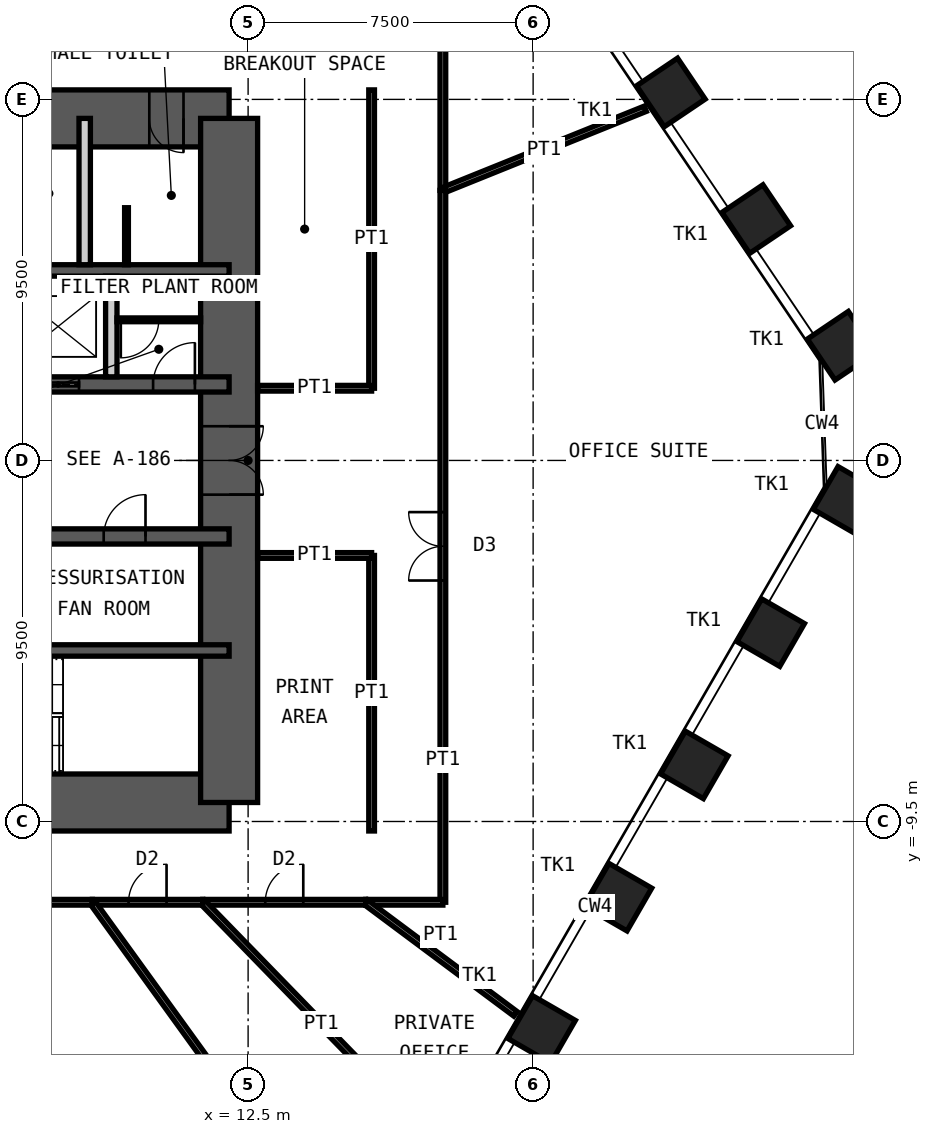
"""IFC4 building model, lengths in metres.
Left out: names, types, materials, properties, quantities, classifications, styles, units other than length and angle.
Written with IfcOpenShell. Run it as: python <this file> out.ifc"""

import sys

from ifc_helpers import new_model, si_unit, direction, frame, frame_2d, origin, origin_2d, place, context, subcontext, project, spatial, rectangle, hollow_rectangle, extrude, element, fill, save


model = new_model("IFC4")
c1 = context("Model", 3, precision=1e-05, world=origin(), true_north=direction((0.0, 1.0)))
c2 = subcontext(c1, "Body", "Model", "MODEL_VIEW")
j1 = project(units=[si_unit("LENGTHUNIT", "METRE"), si_unit("PLANEANGLEUNIT", "RADIAN")], contexts=[c1])
p1 = place(None, origin())
s1 = spatial("IfcSite", under=j1, at=p1, CompositionType="ELEMENT")
p2 = place(p1, origin())
s2 = spatial("IfcBuilding", under=s1, at=p2, CompositionType="ELEMENT")
p3 = place(p2, frame((0.0, 0.0, 170.2)))
s3 = spatial("IfcBuildingStorey", under=s2, at=p3, CompositionType="ELEMENT", Elevation=170.2)
for number, where, z_axis, x_axis in (
    (1, (23.625, 9.682, 0.0), (0.0, 0.0, 1.0), (-0.559, 0.829, 0.0)),
    (2, (25.872, 6.351, 0.0), (0.0, 0.0, 1.0), (-0.559, 0.829, 0.0)),
    (3, (28.119, 3.019, 0.0), (0.0, 0.0, 1.0), (-0.559, 0.829, 0.0)),
    (4, (28.261, -1.05, 0.0), (0.0, 0.0, 1.0), (0.5, 0.866, 0.0)),
    (5, (26.252, -4.53, 0.0), (0.0, 0.0, 1.0), (0.5, 0.866, 0.0)),
    (6, (24.242, -8.011, 0.0), (0.0, 0.0, 1.0), (0.5, 0.866, 0.0)),
    (7, (22.233, -11.491, 0.0), (0.0, 0.0, 1.0), (0.5, 0.866, 0.0)),
    (8, (20.223, -14.972, 0.0), (0.0, 0.0, 1.0), (0.5, 0.866, 0.0)),
):
    element("IfcColumn", number, at=place(p3, frame(where, z_axis=z_axis, x_axis=x_axis)), inside=s3, PredefinedType="COLUMN", context=c2, shape_type="SweptSolid", body=[
        extrude(hollow_rectangle(XDim=1.3, YDim=1.3, WallThickness=0.1, at=origin_2d()), origin(), (0.0, 0.0, 1.0), 4.2),
    ])
p4 = place(p3, frame((-12.0, 9.0, 0.0), z_axis=(0.0, 0.0, 1.0), x_axis=(1.0, 0.0, 0.0)))
e9 = element("IfcWall", 9, at=p4, inside=s3, PredefinedType="SHEAR", context=c2, shape_type="SweptSolid", body=[
    extrude(rectangle(XDim=24.0, YDim=1.5, at=frame_2d((12.0, 0.0))), origin(), (0.0, 0.0, 1.0), 4.2),
])
p5 = place(p4, frame((10.4, 0.0, 0.0)))
e10 = element("IfcOpeningElement", 10, at=p5, cuts=e9, PredefinedType="OPENING", context=c2, shape_type="SweptSolid", body=[
    extrude(rectangle(XDim=1.0, YDim=2.1, at=frame_2d((0.5, 1.05))), frame((0.0, 0.76, 0.0), z_axis=(0.0, -1.0, 0.0), x_axis=(1.0, 0.0, 0.0)), (0.0, 0.0, 1.0), 1.52),
])
p6 = place(p4, frame((17.6, 0.0, 0.0)))
e11 = element("IfcOpeningElement", 11, at=p6, cuts=e9, PredefinedType="OPENING", context=c2, shape_type="SweptSolid", body=[
    extrude(rectangle(XDim=0.9, YDim=2.1, at=frame_2d((0.45, 1.05))), frame((0.0, 0.76, 0.0), z_axis=(0.0, -1.0, 0.0), x_axis=(1.0, 0.0, 0.0)), (0.0, 0.0, 1.0), 1.52),
])
p7 = place(p4, frame((21.9, 0.0, 0.0)))
e12 = element("IfcOpeningElement", 12, at=p7, cuts=e9, PredefinedType="OPENING", context=c2, shape_type="SweptSolid", body=[
    extrude(rectangle(XDim=0.9, YDim=2.1, at=frame_2d((0.45, 1.05))), frame((0.0, 0.76, 0.0), z_axis=(0.0, -1.0, 0.0), x_axis=(1.0, 0.0, 0.0)), (0.0, 0.0, 1.0), 1.52),
])
p8 = place(p3, frame((-12.0, -9.0, 0.0), z_axis=(0.0, 0.0, 1.0), x_axis=(1.0, 0.0, 0.0)))
e13 = element("IfcWall", 13, at=p8, inside=s3, PredefinedType="SHEAR", context=c2, shape_type="SweptSolid", body=[
    extrude(rectangle(XDim=24.0, YDim=1.5, at=frame_2d((12.0, 0.0))), origin(), (0.0, 0.0, 1.0), 4.2),
])
p9 = place(p8, frame((1.35, 0.0, 0.0)))
e14 = element("IfcOpeningElement", 14, at=p9, cuts=e13, PredefinedType="OPENING", context=c2, shape_type="SweptSolid", body=[
    extrude(rectangle(XDim=1.0, YDim=2.1, at=frame_2d((0.5, 1.05))), frame((0.0, 0.76, 0.0), z_axis=(0.0, -1.0, 0.0), x_axis=(1.0, 0.0, 0.0)), (0.0, 0.0, 1.0), 1.52),
])
p10 = place(p8, frame((5.325, 0.0, 0.0)))
e15 = element("IfcOpeningElement", 15, at=p10, cuts=e13, PredefinedType="OPENING", context=c2, shape_type="SweptSolid", body=[
    extrude(rectangle(XDim=1.15, YDim=2.1, at=frame_2d((0.575, 1.05))), frame((0.0, 0.76, 0.0), z_axis=(0.0, -1.0, 0.0), x_axis=(1.0, 0.0, 0.0)), (0.0, 0.0, 1.0), 1.52),
])
p11 = place(p8, frame((12.6, 0.0, 0.0)))
e16 = element("IfcOpeningElement", 16, at=p11, cuts=e13, PredefinedType="OPENING", context=c2, shape_type="SweptSolid", body=[
    extrude(rectangle(XDim=1.0, YDim=2.1, at=frame_2d((0.5, 1.05))), frame((0.0, 0.76, 0.0), z_axis=(0.0, -1.0, 0.0), x_axis=(1.0, 0.0, 0.0)), (0.0, 0.0, 1.0), 1.52),
])
p12 = place(p3, frame((12.0, -9.0, 0.0), z_axis=(0.0, 0.0, 1.0), x_axis=(0.0, 1.0, 0.0)))
e17 = element("IfcWall", 17, at=p12, inside=s3, PredefinedType="SHEAR", context=c2, shape_type="SweptSolid", body=[
    extrude(rectangle(XDim=18.0, YDim=1.5, at=frame_2d((9.0, 0.0))), origin(), (0.0, 0.0, 1.0), 4.2),
])
p13 = place(p12, frame((8.1, 0.0, 0.0)))
e18 = element("IfcOpeningElement", 18, at=p13, cuts=e17, PredefinedType="OPENING", context=c2, shape_type="SweptSolid", body=[
    extrude(rectangle(XDim=1.8, YDim=2.1, at=frame_2d((0.9, 1.05))), frame((0.0, 0.76, 0.0), z_axis=(0.0, -1.0, 0.0), x_axis=(1.0, 0.0, 0.0)), (0.0, 0.0, 1.0), 1.52),
])
p14 = place(p3, frame((-12.0, 5.0, 0.0), z_axis=(0.0, 0.0, 1.0), x_axis=(1.0, 0.0, 0.0)))
e19 = element("IfcWall", 19, at=p14, inside=s3, PredefinedType="SHEAR", context=c2, shape_type="SweptSolid", body=[
    extrude(rectangle(XDim=24.0, YDim=0.3, at=frame_2d((12.0, 0.0))), origin(), (0.0, 0.0, 1.0), 4.2),
])
p15 = place(p3, frame((-12.0, 2.0, 0.0), z_axis=(0.0, 0.0, 1.0), x_axis=(1.0, 0.0, 0.0)))
e20 = element("IfcWall", 20, at=p15, inside=s3, PredefinedType="SHEAR", context=c2, shape_type="SweptSolid", body=[
    extrude(rectangle(XDim=24.0, YDim=0.4, at=frame_2d((12.0, 0.0))), origin(), (0.0, 0.0, 1.0), 4.2),
])
p16 = place(p15, frame((2.4, 0.0, 0.0)))
e21 = element("IfcOpeningElement", 21, at=p16, cuts=e20, PredefinedType="OPENING", context=c2, shape_type="SweptSolid", body=[
    extrude(rectangle(XDim=1.1, YDim=2.1, at=frame_2d((0.55, 1.05))), frame((0.0, 0.21, 0.0), z_axis=(0.0, -1.0, 0.0), x_axis=(1.0, 0.0, 0.0)), (0.0, 0.0, 1.0), 0.42),
])
p17 = place(p15, frame((22.0, 0.0, 0.0)))
e22 = element("IfcOpeningElement", 22, at=p17, cuts=e20, PredefinedType="OPENING", context=c2, shape_type="SweptSolid", body=[
    extrude(rectangle(XDim=1.1, YDim=2.1, at=frame_2d((0.55, 1.05))), frame((0.0, 0.21, 0.0), z_axis=(0.0, -1.0, 0.0), x_axis=(1.0, 0.0, 0.0)), (0.0, 0.0, 1.0), 0.42),
])
p18 = place(p15, frame((10.15, 0.0, 0.0)))
e23 = element("IfcOpeningElement", 23, at=p18, cuts=e20, PredefinedType="OPENING", context=c2, shape_type="SweptSolid", body=[
    extrude(rectangle(XDim=1.0, YDim=2.1, at=frame_2d((0.5, 1.05))), frame((0.0, 0.21, 0.0), z_axis=(0.0, -1.0, 0.0), x_axis=(1.0, 0.0, 0.0)), (0.0, 0.0, 1.0), 0.42),
])
p19 = place(p15, frame((6.9, 0.0, 0.0)))
e24 = element("IfcOpeningElement", 24, at=p19, cuts=e20, PredefinedType="OPENING", context=c2, shape_type="SweptSolid", body=[
    extrude(rectangle(XDim=1.0, YDim=2.1, at=frame_2d((0.5, 1.05))), frame((0.0, 0.21, 0.0), z_axis=(0.0, -1.0, 0.0), x_axis=(1.0, 0.0, 0.0)), (0.0, 0.0, 1.0), 0.42),
])
p20 = place(p15, frame((13.35, 0.0, 0.0)))
e25 = element("IfcOpeningElement", 25, at=p20, cuts=e20, PredefinedType="OPENING", context=c2, shape_type="SweptSolid", body=[
    extrude(rectangle(XDim=1.1, YDim=2.4, at=frame_2d((0.55, 1.2))), frame((0.0, 0.21, 0.0), z_axis=(0.0, -1.0, 0.0), x_axis=(1.0, 0.0, 0.0)), (0.0, 0.0, 1.0), 0.42),
])
p21 = place(p15, frame((16.15, 0.0, 0.0)))
e26 = element("IfcOpeningElement", 26, at=p21, cuts=e20, PredefinedType="OPENING", context=c2, shape_type="SweptSolid", body=[
    extrude(rectangle(XDim=1.1, YDim=2.4, at=frame_2d((0.55, 1.2))), frame((0.0, 0.21, 0.0), z_axis=(0.0, -1.0, 0.0), x_axis=(1.0, 0.0, 0.0)), (0.0, 0.0, 1.0), 0.42),
])
p22 = place(p15, frame((18.95, 0.0, 0.0)))
e27 = element("IfcOpeningElement", 27, at=p22, cuts=e20, PredefinedType="OPENING", context=c2, shape_type="SweptSolid", body=[
    extrude(rectangle(XDim=1.1, YDim=2.4, at=frame_2d((0.55, 1.2))), frame((0.0, 0.21, 0.0), z_axis=(0.0, -1.0, 0.0), x_axis=(1.0, 0.0, 0.0)), (0.0, 0.0, 1.0), 0.42),
])
p23 = place(p3, frame((-12.0, -2.0, 0.0), z_axis=(0.0, 0.0, 1.0), x_axis=(1.0, 0.0, 0.0)))
e28 = element("IfcWall", 28, at=p23, inside=s3, PredefinedType="SHEAR", context=c2, shape_type="SweptSolid", body=[
    extrude(rectangle(XDim=24.0, YDim=0.4, at=frame_2d((12.0, 0.0))), origin(), (0.0, 0.0, 1.0), 4.2),
])
p24 = place(p23, frame((1.1, 0.0, 0.0)))
e29 = element("IfcOpeningElement", 29, at=p24, cuts=e28, PredefinedType="OPENING", context=c2, shape_type="SweptSolid", body=[
    extrude(rectangle(XDim=1.1, YDim=2.1, at=frame_2d((0.55, 1.05))), frame((0.0, 0.21, 0.0), z_axis=(0.0, -1.0, 0.0), x_axis=(1.0, 0.0, 0.0)), (0.0, 0.0, 1.0), 0.42),
])
p25 = place(p23, frame((13.55, 0.0, 0.0)))
e30 = element("IfcOpeningElement", 30, at=p25, cuts=e28, PredefinedType="OPENING", context=c2, shape_type="SweptSolid", body=[
    extrude(rectangle(XDim=1.1, YDim=2.1, at=frame_2d((0.55, 1.05))), frame((0.0, 0.21, 0.0), z_axis=(0.0, -1.0, 0.0), x_axis=(1.0, 0.0, 0.0)), (0.0, 0.0, 1.0), 0.42),
])
p26 = place(p23, frame((20.7, 0.0, 0.0)))
e31 = element("IfcOpeningElement", 31, at=p26, cuts=e28, PredefinedType="OPENING", context=c2, shape_type="SweptSolid", body=[
    extrude(rectangle(XDim=1.1, YDim=2.1, at=frame_2d((0.55, 1.05))), frame((0.0, 0.21, 0.0), z_axis=(0.0, -1.0, 0.0), x_axis=(1.0, 0.0, 0.0)), (0.0, 0.0, 1.0), 0.42),
])
p27 = place(p23, frame((4.0, 0.0, 0.0)))
e32 = element("IfcOpeningElement", 32, at=p27, cuts=e28, PredefinedType="OPENING", context=c2, shape_type="SweptSolid", body=[
    extrude(rectangle(XDim=1.0, YDim=2.1, at=frame_2d((0.5, 1.05))), frame((0.0, 0.21, 0.0), z_axis=(0.0, -1.0, 0.0), x_axis=(1.0, 0.0, 0.0)), (0.0, 0.0, 1.0), 0.42),
])
p28 = place(p3, frame((-12.0, -5.0, 0.0), z_axis=(0.0, 0.0, 1.0), x_axis=(1.0, 0.0, 0.0)))
e33 = element("IfcWall", 33, at=p28, inside=s3, PredefinedType="SHEAR", context=c2, shape_type="SweptSolid", body=[
    extrude(rectangle(XDim=24.0, YDim=0.3, at=frame_2d((12.0, 0.0))), origin(), (0.0, 0.0, 1.0), 4.2),
])
p29 = place(p3, frame((8.2, 5.15, 0.0), z_axis=(0.0, 0.0, 1.0), x_axis=(0.0, 1.0, 0.0)))
e34 = element("IfcWall", 34, at=p29, inside=s3, PredefinedType="PARTITIONING", context=c2, shape_type="SweptSolid", body=[
    extrude(rectangle(XDim=3.85, YDim=0.3, at=frame_2d((1.925, 0.0))), origin(), (0.0, 0.0, 1.0), 3.98),
])
p30 = place(p3, frame((8.9, 2.2, 0.0), z_axis=(0.0, 0.0, 1.0), x_axis=(0.0, 1.0, 0.0)))
e35 = element("IfcWall", 35, at=p30, inside=s3, PredefinedType="PARTITIONING", context=c2, shape_type="SweptSolid", body=[
    extrude(rectangle(XDim=2.65, YDim=0.3, at=frame_2d((1.325, 0.0))), origin(), (0.0, 0.0, 1.0), 3.98),
])
p31 = place(p3, frame((9.05, 3.7, 0.0), z_axis=(0.0, 0.0, 1.0), x_axis=(1.0, 0.0, 0.0)))
e36 = element("IfcWall", 36, at=p31, inside=s3, PredefinedType="PARTITIONING", context=c2, shape_type="SweptSolid", body=[
    extrude(rectangle(XDim=2.2, YDim=0.1, at=frame_2d((1.1, 0.0))), origin(), (0.0, 0.0, 1.0), 3.98),
])
p32 = place(p31, frame((0.1, 0.0, 0.0)))
e37 = element("IfcOpeningElement", 37, at=p32, cuts=e36, PredefinedType="OPENING", context=c2, shape_type="SweptSolid", body=[
    extrude(rectangle(XDim=1.0, YDim=2.4, at=frame_2d((0.5, 1.2))), frame((0.0, 0.06, 0.0), z_axis=(0.0, -1.0, 0.0), x_axis=(1.0, 0.0, 0.0)), (0.0, 0.0, 1.0), 0.12),
])
p33 = place(p3, frame((9.3, 5.15, 0.0), z_axis=(0.0, 0.0, 1.0), x_axis=(0.0, 1.0, 0.0)))
e38 = element("IfcWall", 38, at=p33, inside=s3, PredefinedType="PARTITIONING", context=c2, shape_type="SweptSolid", body=[
    extrude(rectangle(XDim=1.5, YDim=0.1, at=frame_2d((0.75, 0.0))), origin(), (0.0, 0.0, 1.0), 2.1),
])
p34 = place(p3, frame((17.625, 11.625, 0.0), z_axis=(0.0, 0.0, 1.0), x_axis=(0.0, -1.0, 0.0)))
e39 = element("IfcWall", 39, at=p34, inside=s3, PredefinedType="PARTITIONING", context=c2, shape_type="SweptSolid", body=[
    extrude(rectangle(XDim=4.519, YDim=0.15, at=frame_2d((2.26, 0.0))), origin(), (0.0, 0.0, 1.0), 3.92),
])
p35 = place(p3, frame((22.951, 9.254, 0.0), z_axis=(0.0, 0.0, 1.0), x_axis=(-0.927444087873, -0.373961848147, 0.0)))
e40 = element("IfcWall", 40, at=p35, inside=s3, PredefinedType="PARTITIONING", context=c2, shape_type="SweptSolid", body=[
    extrude(rectangle(XDim=5.743, YDim=0.15, at=frame_2d((2.872, 0.0))), origin(), (0.0, 0.0, 1.0), 2.72),
])
p36 = place(p3, frame((17.625, 7.106, 0.0), z_axis=(0.0, 0.0, 1.0), x_axis=(0.0, -1.0, 0.0)))
e41 = element("IfcWall", 41, at=p36, inside=s3, PredefinedType="PARTITIONING", context=c2, shape_type="SweptSolid", body=[
    extrude(rectangle(XDim=18.731, YDim=0.15, at=frame_2d((9.365, 0.0))), origin(), (0.0, 0.0, 1.0), 3.92),
])
p37 = place(p36, frame((8.466, 0.0, 0.0)))
e42 = element("IfcOpeningElement", 42, at=p37, cuts=e41, PredefinedType="OPENING", context=c2, shape_type="SweptSolid", body=[
    extrude(rectangle(XDim=1.8, YDim=2.4, at=frame_2d((0.9, 1.2))), frame((0.0, 0.085, 0.0), z_axis=(0.0, -1.0, 0.0), x_axis=(1.0, 0.0, 0.0)), (0.0, 0.0, 1.0), 0.17),
])
p38 = place(p3, frame((17.625, -11.625, 0.0), z_axis=(0.0, 0.0, 1.0), x_axis=(-1.0, 0.0, 0.0)))
e43 = element("IfcWall", 43, at=p38, inside=s3, PredefinedType="PARTITIONING", context=c2, shape_type="SweptSolid", body=[
    extrude(rectangle(XDim=2.029, YDim=0.15, at=frame_2d((1.014, 0.0))), origin(), (0.0, 0.0, 1.0), 3.92),
])
p39 = place(p3, frame((19.537, -14.562, 0.0), z_axis=(0.0, 0.0, 1.0), x_axis=(-0.801778753003, 0.597620976233, 0.0)))
e44 = element("IfcWall", 44, at=p39, inside=s3, PredefinedType="PARTITIONING", context=c2, shape_type="SweptSolid", body=[
    extrude(rectangle(XDim=4.915, YDim=0.15, at=frame_2d((2.458, 0.0))), origin(), (0.0, 0.0, 1.0), 2.72),
])
p40 = place(p3, frame((15.596, -11.625, 0.0), z_axis=(0.0, 0.0, 1.0), x_axis=(-1.0, 0.0, 0.0)))
e45 = element("IfcWall", 45, at=p40, inside=s3, PredefinedType="PARTITIONING", context=c2, shape_type="SweptSolid", body=[
    extrude(rectangle(XDim=4.289, YDim=0.15, at=frame_2d((2.145, 0.0))), origin(), (0.0, 0.0, 1.0), 3.92),
])
p41 = place(p40, frame((1.645, 0.0, 0.0)))
e46 = element("IfcOpeningElement", 46, at=p41, cuts=e45, PredefinedType="OPENING", context=c2, shape_type="SweptSolid", body=[
    extrude(rectangle(XDim=1.0, YDim=2.4, at=frame_2d((0.5, 1.2))), frame((0.0, 0.085, 0.0), z_axis=(0.0, -1.0, 0.0), x_axis=(1.0, 0.0, 0.0)), (0.0, 0.0, 1.0), 0.17),
])
p42 = place(p3, frame((17.538, -18.031, 0.0), z_axis=(0.0, 0.0, 1.0), x_axis=(-0.697230918085, 0.716846599257, 0.0)))
e47 = element("IfcWall", 47, at=p42, inside=s3, PredefinedType="PARTITIONING", context=c2, shape_type="SweptSolid", body=[
    extrude(rectangle(XDim=8.936, YDim=0.15, at=frame_2d((4.468, 0.0))), origin(), (0.0, 0.0, 1.0), 2.72),
])
p43 = place(p3, frame((11.307, -11.625, 0.0), z_axis=(0.0, 0.0, 1.0), x_axis=(-1.0, 0.0, 0.0)))
e48 = element("IfcWall", 48, at=p43, inside=s3, PredefinedType="PARTITIONING", context=c2, shape_type="SweptSolid", body=[
    extrude(rectangle(XDim=2.906, YDim=0.15, at=frame_2d((1.453, 0.0))), origin(), (0.0, 0.0, 1.0), 3.92),
])
p44 = place(p43, frame((0.953, 0.0, 0.0)))
e49 = element("IfcOpeningElement", 49, at=p44, cuts=e48, PredefinedType="OPENING", context=c2, shape_type="SweptSolid", body=[
    extrude(rectangle(XDim=1.0, YDim=2.4, at=frame_2d((0.5, 1.2))), frame((0.0, 0.085, 0.0), z_axis=(0.0, -1.0, 0.0), x_axis=(1.0, 0.0, 0.0)), (0.0, 0.0, 1.0), 0.17),
])
p45 = place(p3, frame((15.54, -21.502, 0.0), z_axis=(0.0, 0.0, 1.0), x_axis=(-0.585731902034, 0.810504866697, 0.0)))
e50 = element("IfcWall", 50, at=p45, inside=s3, PredefinedType="PARTITIONING", context=c2, shape_type="SweptSolid", body=[
    extrude(rectangle(XDim=12.187, YDim=0.15, at=frame_2d((6.093, 0.0))), origin(), (0.0, 0.0, 1.0), 2.72),
])
p46 = place(p3, frame((8.401, -11.625, 0.0), z_axis=(0.0, 0.0, 1.0), x_axis=(-1.0, 0.0, 0.0)))
e51 = element("IfcWall", 51, at=p46, inside=s3, PredefinedType="PARTITIONING", context=c2, shape_type="SweptSolid", body=[
    extrude(rectangle(XDim=10.044, YDim=0.15, at=frame_2d((5.022, 0.0))), origin(), (0.0, 0.0, 1.0), 3.92),
])
p47 = place(p46, frame((4.122, 0.0, 0.0)))
e52 = element("IfcOpeningElement", 52, at=p47, cuts=e51, PredefinedType="OPENING", context=c2, shape_type="SweptSolid", body=[
    extrude(rectangle(XDim=1.8, YDim=2.4, at=frame_2d((0.9, 1.2))), frame((0.0, 0.085, 0.0), z_axis=(0.0, -1.0, 0.0), x_axis=(1.0, 0.0, 0.0)), (0.0, 0.0, 1.0), 0.17),
])
p48 = place(p3, frame((15.75, 1.9, 0.0), z_axis=(0.0, 0.0, 1.0), x_axis=(0.0, 1.0, 0.0)))
e53 = element("IfcWall", 53, at=p48, inside=s3, PredefinedType="PARTITIONING", context=c2, shape_type="SweptSolid", body=[
    extrude(rectangle(XDim=7.85, YDim=0.15, at=frame_2d((3.925, 0.0))), origin(), (0.0, 0.0, 1.0), 3.92),
])
p49 = place(p3, frame((12.75, 1.9, 0.0), z_axis=(0.0, 0.0, 1.0), x_axis=(1.0, 0.0, 0.0)))
e54 = element("IfcWall", 54, at=p49, inside=s3, PredefinedType="PARTITIONING", context=c2, shape_type="SweptSolid", body=[
    extrude(rectangle(XDim=3.0, YDim=0.15, at=frame_2d((1.5, 0.0))), origin(), (0.0, 0.0, 1.0), 2.72),
])
p50 = place(p3, frame((15.75, -9.75, 0.0), z_axis=(0.0, 0.0, 1.0), x_axis=(0.0, 1.0, 0.0)))
e55 = element("IfcWall", 55, at=p50, inside=s3, PredefinedType="PARTITIONING", context=c2, shape_type="SweptSolid", body=[
    extrude(rectangle(XDim=7.25, YDim=0.15, at=frame_2d((3.625, 0.0))), origin(), (0.0, 0.0, 1.0), 3.92),
])
p51 = place(p3, frame((12.75, -2.5, 0.0), z_axis=(0.0, 0.0, 1.0), x_axis=(1.0, 0.0, 0.0)))
e56 = element("IfcWall", 56, at=p51, inside=s3, PredefinedType="PARTITIONING", context=c2, shape_type="SweptSolid", body=[
    extrude(rectangle(XDim=3.0, YDim=0.15, at=frame_2d((1.5, 0.0))), origin(), (0.0, 0.0, 1.0), 2.72),
])
p52 = place(p7, origin())
e57 = element("IfcDoor", 57, at=p52, inside=s3, OperationType="SINGLE_SWING_RIGHT", PredefinedType="DOOR", context=c2, shape_type="SweptSolid", body=[
    extrude(rectangle(XDim=0.9, YDim=2.1, at=frame_2d((0.45, 1.05))), frame((0.0, 0.025, 0.0), z_axis=(0.0, -1.0, 0.0), x_axis=(1.0, 0.0, 0.0)), (0.0, 0.0, 1.0), 0.05),
])
fill(e12, e57)
p53 = place(p17, origin())
e58 = element("IfcDoor", 58, at=p53, inside=s3, OperationType="SINGLE_SWING_LEFT", PredefinedType="DOOR", context=c2, shape_type="SweptSolid", body=[
    extrude(rectangle(XDim=1.1, YDim=2.1, at=frame_2d((0.55, 1.05))), frame((0.0, 0.025, 0.0), z_axis=(0.0, -1.0, 0.0), x_axis=(1.0, 0.0, 0.0)), (0.0, 0.0, 1.0), 0.05),
])
fill(e22, e58)
p54 = place(p26, origin())
e59 = element("IfcDoor", 59, at=p54, inside=s3, OperationType="SINGLE_SWING_LEFT", PredefinedType="DOOR", context=c2, shape_type="SweptSolid", body=[
    extrude(rectangle(XDim=1.1, YDim=2.1, at=frame_2d((0.55, 1.05))), frame((0.0, 0.025, 0.0), z_axis=(0.0, -1.0, 0.0), x_axis=(1.0, 0.0, 0.0)), (0.0, 0.0, 1.0), 0.05),
])
fill(e31, e59)
p55 = place(p13, origin())
e60 = element("IfcDoor", 60, at=p55, inside=s3, OperationType="DOUBLE_DOOR_DOUBLE_SWING", PredefinedType="DOOR", context=c2, shape_type="SweptSolid", body=[
    extrude(rectangle(XDim=1.8, YDim=2.1, at=frame_2d((0.9, 1.05))), frame((0.0, 0.025, 0.0), z_axis=(0.0, -1.0, 0.0), x_axis=(1.0, 0.0, 0.0)), (0.0, 0.0, 1.0), 0.05),
])
fill(e18, e60)
p56 = place(p22, origin())
e61 = element("IfcDoor", 61, at=p56, inside=s3, OperationType="DOUBLE_DOOR_SLIDING", PredefinedType="DOOR", context=c2, shape_type="SweptSolid", body=[
    extrude(rectangle(XDim=1.1, YDim=2.4, at=frame_2d((0.55, 1.2))), frame((0.0, 0.025, 0.0), z_axis=(0.0, -1.0, 0.0), x_axis=(1.0, 0.0, 0.0)), (0.0, 0.0, 1.0), 0.05),
])
fill(e27, e61)
p57 = place(p32, origin())
e62 = element("IfcDoor", 62, at=p57, inside=s3, OperationType="SINGLE_SWING_LEFT", PredefinedType="DOOR", context=c2, shape_type="SweptSolid", body=[
    extrude(rectangle(XDim=1.0, YDim=2.4, at=frame_2d((0.5, 1.2))), frame((0.0, 0.025, 0.0), z_axis=(0.0, -1.0, 0.0), x_axis=(1.0, 0.0, 0.0)), (0.0, 0.0, 1.0), 0.05),
])
fill(e37, e62)
p58 = place(p37, origin())
e63 = element("IfcDoor", 63, at=p58, inside=s3, OperationType="DOUBLE_DOOR_DOUBLE_SWING", PredefinedType="DOOR", context=c2, shape_type="SweptSolid", body=[
    extrude(rectangle(XDim=1.8, YDim=2.4, at=frame_2d((0.9, 1.2))), frame((0.0, 0.025, 0.0), z_axis=(0.0, -1.0, 0.0), x_axis=(1.0, 0.0, 0.0)), (0.0, 0.0, 1.0), 0.05),
])
fill(e42, e63)
p59 = place(p41, origin())
e64 = element("IfcDoor", 64, at=p59, inside=s3, OperationType="SINGLE_SWING_LEFT", PredefinedType="DOOR", context=c2, shape_type="SweptSolid", body=[
    extrude(rectangle(XDim=1.0, YDim=2.4, at=frame_2d((0.5, 1.2))), frame((0.0, 0.025, 0.0), z_axis=(0.0, -1.0, 0.0), x_axis=(1.0, 0.0, 0.0)), (0.0, 0.0, 1.0), 0.05),
])
fill(e46, e64)
p60 = place(p44, origin())
e65 = element("IfcDoor", 65, at=p60, inside=s3, OperationType="SINGLE_SWING_LEFT", PredefinedType="DOOR", context=c2, shape_type="SweptSolid", body=[
    extrude(rectangle(XDim=1.0, YDim=2.4, at=frame_2d((0.5, 1.2))), frame((0.0, 0.025, 0.0), z_axis=(0.0, -1.0, 0.0), x_axis=(1.0, 0.0, 0.0)), (0.0, 0.0, 1.0), 0.05),
])
fill(e49, e65)
save(model, sys.argv[1])
